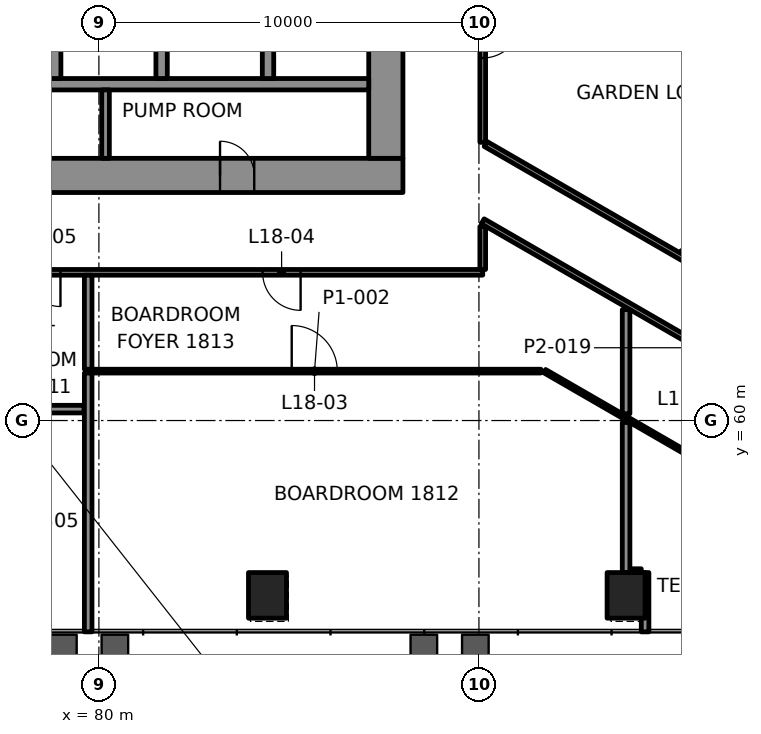
"""IFC4 building model, lengths in metres.
Left out: names, types, materials, properties, quantities, classifications, styles, units other than length and angle.
Written with IfcOpenShell. Run it as: python <this file> out.ifc"""

import sys

from ifc_helpers import new_model, si_unit, direction, frame, frame_2d, origin, origin_2d, place, context, subcontext, project, spatial, rectangle, extrude, element, fill, save


model = new_model("IFC4")
c1 = context("Model", 3, precision=1e-05, world=origin(), true_north=direction((0.0, 1.0)))
c2 = subcontext(c1, "Body", "Model", "MODEL_VIEW")
j1 = project(units=[si_unit("LENGTHUNIT", "METRE"), si_unit("PLANEANGLEUNIT", "RADIAN")], contexts=[c1])
p1 = place(None, origin())
s1 = spatial("IfcSite", under=j1, at=p1, CompositionType="ELEMENT")
p2 = place(p1, origin())
s2 = spatial("IfcBuilding", under=s1, at=p2, CompositionType="ELEMENT")
p3 = place(p2, frame((0.0, 0.0, 82.0)))
s3 = spatial("IfcBuildingStorey", under=s2, at=p3, CompositionType="ELEMENT", Elevation=82.0)
for number, where, z_axis, x_axis in (
    (1, (84.436, 55.399, -0.0), (0.0, 0.0, 1.0), (1.0, 0.0, 0.0)),
    (2, (93.872, 55.399, -0.0), (0.0, 0.0, 1.0), (1.0, 0.0, 0.0)),
):
    element("IfcColumn", number, at=place(p3, frame(where, z_axis=z_axis, x_axis=x_axis)), inside=s3, PredefinedType="COLUMN", context=c2, shape_type="SweptSolid", body=[
        extrude(rectangle(XDim=1.0, YDim=1.2, at=origin_2d()), origin(), (0.0, 0.0, 1.0), 4.2),
    ])
p4 = place(p3, frame((62.0, 66.45, 0.0), z_axis=(0.0, 0.0, 1.0), x_axis=(1.0, 0.0, 0.0)))
e3 = element("IfcWall", 3, at=p4, inside=s3, PredefinedType="SHEAR", context=c2, shape_type="SweptSolid", body=[
    extrude(rectangle(XDim=26.0, YDim=0.9, at=frame_2d((13.0, 0.0))), origin(), (0.0, 0.0, 1.0), 4.0),
])
p5 = place(p4, frame((3.45, 0.0, 0.0)))
e4 = element("IfcOpeningElement", 4, at=p5, cuts=e3, PredefinedType="OPENING", context=c2, shape_type="SweptSolid", body=[
    extrude(rectangle(XDim=0.9, YDim=2.1, at=frame_2d((0.45, 1.05))), frame((0.0, 0.46, 0.0), z_axis=(0.0, -1.0, 0.0), x_axis=(1.0, 0.0, 0.0)), (0.0, 0.0, 1.0), 0.92),
])
p6 = place(p4, frame((6.425, 0.0, 0.0)))
e5 = element("IfcOpeningElement", 5, at=p6, cuts=e3, PredefinedType="OPENING", context=c2, shape_type="SweptSolid", body=[
    extrude(rectangle(XDim=0.9, YDim=2.1, at=frame_2d((0.45, 1.05))), frame((0.0, 0.46, 0.0), z_axis=(0.0, -1.0, 0.0), x_axis=(1.0, 0.0, 0.0)), (0.0, 0.0, 1.0), 0.92),
])
p7 = place(p4, frame((9.4, 0.0, 0.0)))
e6 = element("IfcOpeningElement", 6, at=p7, cuts=e3, PredefinedType="OPENING", context=c2, shape_type="SweptSolid", body=[
    extrude(rectangle(XDim=0.9, YDim=2.1, at=frame_2d((0.45, 1.05))), frame((0.0, 0.46, 0.0), z_axis=(0.0, -1.0, 0.0), x_axis=(1.0, 0.0, 0.0)), (0.0, 0.0, 1.0), 0.92),
])
p8 = place(p4, frame((14.262, 0.0, 0.0)))
e7 = element("IfcOpeningElement", 7, at=p8, cuts=e3, PredefinedType="OPENING", context=c2, shape_type="SweptSolid", body=[
    extrude(rectangle(XDim=0.9, YDim=2.1, at=frame_2d((0.45, 1.05))), frame((0.0, 0.46, 0.0), z_axis=(0.0, -1.0, 0.0), x_axis=(1.0, 0.0, 0.0)), (0.0, 0.0, 1.0), 0.92),
])
p9 = place(p4, frame((21.188, 0.0, 0.0)))
e8 = element("IfcOpeningElement", 8, at=p9, cuts=e3, PredefinedType="OPENING", context=c2, shape_type="SweptSolid", body=[
    extrude(rectangle(XDim=0.9, YDim=2.1, at=frame_2d((0.45, 1.05))), frame((0.0, 0.46, 0.0), z_axis=(0.0, -1.0, 0.0), x_axis=(1.0, 0.0, 0.0)), (0.0, 0.0, 1.0), 0.92),
])
p10 = place(p3, frame((87.55, 66.9, 0.0), z_axis=(0.0, 0.0, 1.0), x_axis=(0.0, 1.0, 0.0)))
e9 = element("IfcWall", 9, at=p10, inside=s3, PredefinedType="SHEAR", context=c2, shape_type="SweptSolid", body=[
    extrude(rectangle(XDim=16.2, YDim=0.9, at=frame_2d((8.1, 0.0))), origin(), (0.0, 0.0, 1.0), 4.0),
])
p11 = place(p10, frame((5.5, 0.0, 0.0)))
e10 = element("IfcOpeningElement", 10, at=p11, cuts=e9, PredefinedType="OPENING", context=c2, shape_type="SweptSolid", body=[
    extrude(rectangle(XDim=1.8, YDim=2.1, at=frame_2d((0.9, 1.05))), frame((0.0, 0.46, 0.0), z_axis=(0.0, -1.0, 0.0), x_axis=(1.0, 0.0, 0.0)), (0.0, 0.0, 1.0), 0.92),
])
p12 = place(p10, frame((11.738, 0.0, 0.0)))
e11 = element("IfcOpeningElement", 11, at=p12, cuts=e9, PredefinedType="OPENING", context=c2, shape_type="SweptSolid", body=[
    extrude(rectangle(XDim=0.9, YDim=2.1, at=frame_2d((0.45, 1.05))), frame((0.0, 0.46, 0.0), z_axis=(0.0, -1.0, 0.0), x_axis=(1.0, 0.0, 0.0)), (0.0, 0.0, 1.0), 0.92),
])
p13 = place(p3, frame((70.35, 68.85, 0.0), z_axis=(0.0, 0.0, 1.0), x_axis=(1.0, 0.0, 0.0)))
e12 = element("IfcWall", 12, at=p13, inside=s3, PredefinedType="SHEAR", context=c2, shape_type="SweptSolid", body=[
    extrude(rectangle(XDim=16.75, YDim=0.3, at=frame_2d((8.375, 0.0))), origin(), (0.0, 0.0, 1.0), 4.0),
])
for number, where, z_axis, x_axis in (
    (13, (78.85, 69.0, 0.0), (0.0, 0.0, 1.0), (0.0, 1.0, 0.0)),
    (14, (81.65, 69.0, 0.0), (0.0, 0.0, 1.0), (0.0, 1.0, 0.0)),
    (15, (84.45, 69.0, 0.0), (0.0, 0.0, 1.0), (0.0, 1.0, 0.0)),
):
    element("IfcWall", number, at=place(p3, frame(where, z_axis=z_axis, x_axis=x_axis)), inside=s3, PredefinedType="SHEAR", context=c2, shape_type="SweptSolid", body=[
        extrude(rectangle(XDim=2.6, YDim=0.3, at=frame_2d((1.3, 0.0))), origin(), (0.0, 0.0, 1.0), 4.0),
    ])
p14 = place(p3, frame((93.972, 55.999, 0.0), z_axis=(0.0, 0.0, 1.0), x_axis=(1.0, 0.0, 0.0)))
e16 = element("IfcWall", 16, at=p14, inside=s3, PredefinedType="PARTITIONING", context=c2, shape_type="SweptSolid", body=[
    extrude(rectangle(XDim=0.299, YDim=0.2, at=frame_2d((0.15, 0.0))), origin(), (0.0, 0.0, 1.0), 3.4),
])
p15 = place(p3, frame((72.641, 60.3, 0.0), z_axis=(0.0, 0.0, 1.0), x_axis=(1.0, 0.0, 0.0)))
e17 = element("IfcWall", 17, at=p15, inside=s3, PredefinedType="PARTITIONING", context=c2, shape_type="SweptSolid", body=[
    extrude(rectangle(XDim=6.967, YDim=0.2, at=frame_2d((3.484, 0.0))), origin(), (0.0, 0.0, 1.0), 3.4),
])
p16 = place(p3, frame((79.718, 61.3, 0.0), z_axis=(0.0, 0.0, 1.0), x_axis=(1.0, 0.0, 0.0)))
e18 = element("IfcWall", 18, at=p16, inside=s3, PredefinedType="PARTITIONING", context=c2, shape_type="SweptSolid", body=[
    extrude(rectangle(XDim=11.911, YDim=0.1, at=frame_2d((5.956, 0.0))), origin(), (0.0, 0.0, 1.0), 3.4),
])
p17 = place(p16, frame((5.355, 0.0, 0.0)))
e19 = element("IfcOpeningElement", 19, at=p17, cuts=e18, PredefinedType="OPENING", context=c2, shape_type="SweptSolid", body=[
    extrude(rectangle(XDim=1.2, YDim=2.1, at=frame_2d((0.6, 1.05))), frame((0.0, 0.06, 0.0), z_axis=(0.0, -1.0, 0.0), x_axis=(1.0, 0.0, 0.0)), (0.0, 0.0, 1.0), 0.12),
])
p18 = place(p3, frame((90.1, 63.9, 0.0), z_axis=(0.0, 0.0, 1.0), x_axis=(-1.0, 0.0, 0.0)))
e20 = element("IfcWall", 20, at=p18, inside=s3, PredefinedType="PARTITIONING", context=c2, shape_type="SweptSolid", body=[
    extrude(rectangle(XDim=30.2, YDim=0.15, at=frame_2d((15.1, 0.0))), origin(), (0.0, 0.0, 1.0), 3.4),
])
p19 = place(p18, frame((4.792, 0.0, 0.0)))
e21 = element("IfcOpeningElement", 21, at=p19, cuts=e20, PredefinedType="OPENING", context=c2, shape_type="SweptSolid", body=[
    extrude(rectangle(XDim=1.0, YDim=2.1, at=frame_2d((0.5, 1.05))), frame((0.0, 0.085, 0.0), z_axis=(0.0, -1.0, 0.0), x_axis=(1.0, 0.0, 0.0)), (0.0, 0.0, 1.0), 0.17),
])
p20 = place(p18, frame((11.111, 0.0, 0.0)))
e22 = element("IfcOpeningElement", 22, at=p20, cuts=e20, PredefinedType="OPENING", context=c2, shape_type="SweptSolid", body=[
    extrude(rectangle(XDim=0.9, YDim=2.1, at=frame_2d((0.45, 1.05))), frame((0.0, 0.085, 0.0), z_axis=(0.0, -1.0, 0.0), x_axis=(1.0, 0.0, 0.0)), (0.0, 0.0, 1.0), 0.17),
])
p21 = place(p18, frame((13.47, 0.0, 0.0)))
e23 = element("IfcOpeningElement", 23, at=p21, cuts=e20, PredefinedType="OPENING", context=c2, shape_type="SweptSolid", body=[
    extrude(rectangle(XDim=0.9, YDim=2.1, at=frame_2d((0.45, 1.05))), frame((0.0, 0.085, 0.0), z_axis=(0.0, -1.0, 0.0), x_axis=(1.0, 0.0, 0.0)), (0.0, 0.0, 1.0), 0.17),
])
p22 = place(p18, frame((15.83, 0.0, 0.0)))
e24 = element("IfcOpeningElement", 24, at=p22, cuts=e20, PredefinedType="OPENING", context=c2, shape_type="SweptSolid", body=[
    extrude(rectangle(XDim=0.9, YDim=2.1, at=frame_2d((0.45, 1.05))), frame((0.0, 0.085, 0.0), z_axis=(0.0, -1.0, 0.0), x_axis=(1.0, 0.0, 0.0)), (0.0, 0.0, 1.0), 0.17),
])
p23 = place(p18, frame((21.677, 0.0, 0.0)))
e25 = element("IfcOpeningElement", 25, at=p23, cuts=e20, PredefinedType="OPENING", context=c2, shape_type="SweptSolid", body=[
    extrude(rectangle(XDim=1.0, YDim=2.1, at=frame_2d((0.5, 1.05))), frame((0.0, 0.085, 0.0), z_axis=(0.0, -1.0, 0.0), x_axis=(1.0, 0.0, 0.0)), (0.0, 0.0, 1.0), 0.17),
])
p24 = place(p18, frame((27.946, 0.0, 0.0)))
e26 = element("IfcOpeningElement", 26, at=p24, cuts=e20, PredefinedType="OPENING", context=c2, shape_type="SweptSolid", body=[
    extrude(rectangle(XDim=1.0, YDim=2.1, at=frame_2d((0.5, 1.05))), frame((0.0, 0.085, 0.0), z_axis=(0.0, -1.0, 0.0), x_axis=(1.0, 0.0, 0.0)), (0.0, 0.0, 1.0), 0.17),
])
p25 = place(p3, frame((95.334, 64.416, 0.0), z_axis=(0.0, 0.0, 1.0), x_axis=(0.866026797969, 0.499997585193, 0.0)))
e27 = element("IfcWall", 27, at=p25, inside=s3, PredefinedType="PARTITIONING", context=c2, shape_type="SweptSolid", body=[
    extrude(rectangle(XDim=6.683, YDim=0.1, at=frame_2d((3.341, 0.0))), origin(), (0.0, 0.0, 1.0), 3.4),
])
p26 = place(p3, frame((94.372, 54.439, 0.0), z_axis=(0.0, 0.0, 1.0), x_axis=(0.0, 1.0, 0.0)))
e28 = element("IfcWall", 28, at=p26, inside=s3, PredefinedType="PARTITIONING", context=c2, shape_type="SweptSolid", body=[
    extrude(rectangle(XDim=1.56, YDim=0.2, at=frame_2d((0.78, 0.0))), origin(), (0.0, 0.0, 1.0), 3.4),
])
p27 = place(p3, frame((93.872, 55.999, 0.0), z_axis=(0.0, 0.0, 1.0), x_axis=(0.0, 1.0, 0.0)))
e29 = element("IfcWall", 29, at=p27, inside=s3, PredefinedType="PARTITIONING", context=c2, shape_type="SweptSolid", body=[
    extrude(rectangle(XDim=3.948, YDim=0.2, at=frame_2d((1.974, 0.0))), origin(), (0.0, 0.0, 1.0), 3.4),
])
p28 = place(p3, frame((90.1, 63.975, 0.0), z_axis=(0.0, 0.0, 1.0), x_axis=(0.0, 1.0, 0.0)))
e30 = element("IfcWall", 30, at=p28, inside=s3, PredefinedType="PARTITIONING", context=c2, shape_type="SweptSolid", body=[
    extrude(rectangle(XDim=1.131, YDim=0.15, at=frame_2d((0.565, 0.0))), origin(), (0.0, 0.0, 1.0), 3.247),
])
p29 = place(p3, frame((90.1, 86.1, 0.0), z_axis=(0.0, 0.0, 1.0), x_axis=(0.0, -1.0, 0.0)))
e31 = element("IfcWall", 31, at=p29, inside=s3, PredefinedType="PARTITIONING", context=c2, shape_type="SweptSolid", body=[
    extrude(rectangle(XDim=18.778, YDim=0.15, at=frame_2d((9.389, 0.0))), origin(), (0.0, 0.0, 1.0), 3.4),
])
p30 = place(p29, frame((7.462, 0.0, 0.0)))
e32 = element("IfcOpeningElement", 32, at=p30, cuts=e31, PredefinedType="OPENING", context=c2, shape_type="SweptSolid", body=[
    extrude(rectangle(XDim=1.0, YDim=2.1, at=frame_2d((0.5, 1.05))), frame((0.0, 0.085, 0.0), z_axis=(0.0, -1.0, 0.0), x_axis=(1.0, 0.0, 0.0)), (0.0, 0.0, 1.0), 0.17),
])
p31 = place(p29, frame((15.559, 0.0, 0.0)))
e33 = element("IfcOpeningElement", 33, at=p31, cuts=e31, PredefinedType="OPENING", context=c2, shape_type="SweptSolid", body=[
    extrude(rectangle(XDim=1.0, YDim=2.1, at=frame_2d((0.5, 1.05))), frame((0.0, 0.085, 0.0), z_axis=(0.0, -1.0, 0.0), x_axis=(1.0, 0.0, 0.0)), (0.0, 0.0, 1.0), 0.17),
])
p32 = place(p3, frame((79.718, 54.439, 0.0), z_axis=(0.0, 0.0, 1.0), x_axis=(0.0, 1.0, 0.0)))
e34 = element("IfcWall", 34, at=p32, inside=s3, PredefinedType="PARTITIONING", context=c2, shape_type="SweptSolid", body=[
    extrude(rectangle(XDim=6.811, YDim=0.2, at=frame_2d((3.405, 0.0))), origin(), (0.0, 0.0, 1.0), 3.165),
])
p33 = place(p3, frame((90.175, 67.278, 0.0), z_axis=(0.0, 0.0, 1.0), x_axis=(0.866024530411, -0.500001512725, 0.0)))
e35 = element("IfcWall", 35, at=p33, inside=s3, PredefinedType="PARTITIONING", context=c2, shape_type="SweptSolid", body=[
    extrude(rectangle(XDim=14.263, YDim=0.15, at=frame_2d((7.131, 0.0))), origin(), (0.0, 0.0, 1.0), 3.4),
])
p34 = place(p33, frame((9.45, 0.0, 0.0)))
e36 = element("IfcOpeningElement", 36, at=p34, cuts=e35, PredefinedType="OPENING", context=c2, shape_type="SweptSolid", body=[
    extrude(rectangle(XDim=1.0, YDim=2.1, at=frame_2d((0.5, 1.05))), frame((0.0, 0.085, 0.0), z_axis=(0.0, -1.0, 0.0), x_axis=(1.0, 0.0, 0.0)), (0.0, 0.0, 1.0), 0.17),
])
p35 = place(p3, frame((101.627, 58.588, 0.0), z_axis=(0.0, 0.0, 1.0), x_axis=(-0.866025527764, 0.499999785261, 0.0)))
e37 = element("IfcWall", 37, at=p35, inside=s3, PredefinedType="PARTITIONING", context=c2, shape_type="SweptSolid", body=[
    extrude(rectangle(XDim=13.31, YDim=0.15, at=frame_2d((6.655, 0.0))), origin(), (0.0, 0.0, 1.0), 3.247),
])
p36 = place(p35, frame((4.079, 0.0, 0.0)))
e38 = element("IfcOpeningElement", 38, at=p36, cuts=e37, PredefinedType="OPENING", context=c2, shape_type="SweptSolid", body=[
    extrude(rectangle(XDim=1.0, YDim=2.1, at=frame_2d((0.5, 1.05))), frame((0.0, 0.085, 0.0), z_axis=(0.0, -1.0, 0.0), x_axis=(1.0, 0.0, 0.0)), (0.0, 0.0, 1.0), 0.17),
])
p37 = place(p3, frame((91.729, 61.3, 0.0), z_axis=(0.0, 0.0, 1.0), x_axis=(0.866025600504, -0.499999659272, 0.0)))
e39 = element("IfcWall", 39, at=p37, inside=s3, PredefinedType="PARTITIONING", context=c2, shape_type="SweptSolid", body=[
    extrude(rectangle(XDim=12.528, YDim=0.1, at=frame_2d((6.264, 0.0))), origin(), (0.0, 0.0, 1.0), 3.4),
])
p38 = place(p37, frame((6.902, 0.0, 0.0)))
e40 = element("IfcOpeningElement", 40, at=p38, cuts=e39, PredefinedType="OPENING", context=c2, shape_type="SweptSolid", body=[
    extrude(rectangle(XDim=1.0, YDim=2.1, at=frame_2d((0.5, 1.05))), frame((0.0, 0.06, 0.0), z_axis=(0.0, -1.0, 0.0), x_axis=(1.0, 0.0, 0.0)), (0.0, 0.0, 1.0), 0.12),
])
p39 = place(p3, frame((79.718, 61.35, 0.0), z_axis=(0.0, 0.0, 1.0), x_axis=(0.0, 1.0, 0.0)))
e41 = element("IfcWall", 41, at=p39, inside=s3, PredefinedType="PARTITIONING", context=c2, shape_type="SweptSolid", body=[
    extrude(rectangle(XDim=2.475, YDim=0.2, at=frame_2d((1.237, 0.0))), origin(), (0.0, 0.0, 1.0), 3.4),
])
p40 = place(p3, frame((93.872, 60.178, 0.0), z_axis=(0.0, 0.0, 1.0), x_axis=(0.0, 1.0, 0.0)))
e42 = element("IfcWall", 42, at=p40, inside=s3, PredefinedType="PARTITIONING", context=c2, shape_type="SweptSolid", body=[
    extrude(rectangle(XDim=2.74, YDim=0.2, at=frame_2d((1.37, 0.0))), origin(), (0.0, 0.0, 1.0), 3.4),
])
p41 = place(p3, frame((110.601, 61.239, 0.0), z_axis=(0.0, 0.0, 1.0), x_axis=(-0.499998492585, 0.866026274089, 0.0)))
e43 = element("IfcWall", 43, at=p41, inside=s3, PredefinedType="SOLIDWALL", context=c2, shape_type="SweptSolid", body=[
    extrude(rectangle(XDim=59.436, YDim=0.8, at=frame_2d((29.718, 0.0))), origin(), (0.0, 0.0, 1.0), 0.9),
])
p42 = place(p3, frame((80.175, 66.9, 0.0), z_axis=(0.0, 0.0, 1.0), x_axis=(0.0, 1.0, 0.0)))
e44 = element("IfcWall", 44, at=p42, inside=s3, PredefinedType="PARTITIONING", context=c2, shape_type="SweptSolid", body=[
    extrude(rectangle(XDim=1.8, YDim=0.2, at=frame_2d((0.9, 0.0))), origin(), (0.0, 0.0, 1.0), 4.0),
])
p43 = place(p17, origin())
e45 = element("IfcDoor", 45, at=p43, inside=s3, OperationType="DOUBLE_DOOR_SINGLE_SWING", PredefinedType="DOOR", context=c2, shape_type="SweptSolid", body=[
    extrude(rectangle(XDim=1.2, YDim=2.1, at=frame_2d((0.6, 1.05))), frame((0.0, 0.025, 0.0), z_axis=(0.0, -1.0, 0.0), x_axis=(1.0, 0.0, 0.0)), (0.0, 0.0, 1.0), 0.05),
])
fill(e19, e45)
p44 = place(p19, origin())
e46 = element("IfcDoor", 46, at=p44, inside=s3, OperationType="SINGLE_SWING_LEFT", PredefinedType="DOOR", context=c2, shape_type="SweptSolid", body=[
    extrude(rectangle(XDim=1.0, YDim=2.1, at=frame_2d((0.5, 1.05))), frame((0.0, 0.025, 0.0), z_axis=(0.0, -1.0, 0.0), x_axis=(1.0, 0.0, 0.0)), (0.0, 0.0, 1.0), 0.05),
])
fill(e21, e46)
p45 = place(p20, origin())
e47 = element("IfcDoor", 47, at=p45, inside=s3, OperationType="SINGLE_SWING_LEFT", PredefinedType="DOOR", context=c2, shape_type="SweptSolid", body=[
    extrude(rectangle(XDim=0.9, YDim=2.1, at=frame_2d((0.45, 1.05))), frame((0.0, 0.025, 0.0), z_axis=(0.0, -1.0, 0.0), x_axis=(1.0, 0.0, 0.0)), (0.0, 0.0, 1.0), 0.05),
])
fill(e22, e47)
p46 = place(p31, origin())
e48 = element("IfcDoor", 48, at=p46, inside=s3, OperationType="SINGLE_SWING_LEFT", PredefinedType="DOOR", context=c2, shape_type="SweptSolid", body=[
    extrude(rectangle(XDim=1.0, YDim=2.1, at=frame_2d((0.5, 1.05))), frame((0.0, 0.025, 0.0), z_axis=(0.0, -1.0, 0.0), x_axis=(1.0, 0.0, 0.0)), (0.0, 0.0, 1.0), 0.05),
])
fill(e33, e48)
p47 = place(p9, origin())
e49 = element("IfcDoor", 49, at=p47, inside=s3, OperationType="SINGLE_SWING_LEFT", PredefinedType="DOOR", context=c2, shape_type="SweptSolid", body=[
    extrude(rectangle(XDim=0.9, YDim=2.1, at=frame_2d((0.45, 1.05))), frame((0.0, 0.17, 0.0), z_axis=(0.0, -1.0, 0.0), x_axis=(1.0, 0.0, 0.0)), (0.0, 0.0, 1.0), 0.34),
])
fill(e8, e49)
save(model, sys.argv[1])
